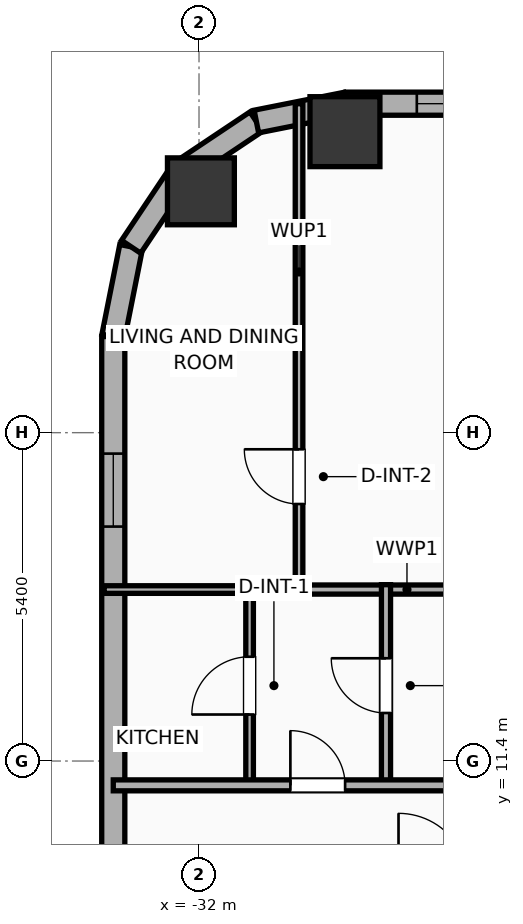
"""IFC4 building model, lengths in metres.
Left out: names, types, materials, properties, quantities, classifications, styles, units other than length and angle.
Written with IfcOpenShell. Run it as: python <this file> out.ifc"""

import sys

from ifc_helpers import new_model, si_unit, direction, frame, frame_2d, origin, origin_2d, place, context, subcontext, project, spatial, rectangle, hollow_rectangle, hollow_circle, extrude, element, fill, save


model = new_model("IFC4")
c1 = context("Model", 3, precision=1e-05, world=origin(), true_north=direction((0.0, 1.0)))
c2 = subcontext(c1, "Body", "Model", "MODEL_VIEW")
j1 = project(units=[si_unit("LENGTHUNIT", "METRE"), si_unit("PLANEANGLEUNIT", "RADIAN")], contexts=[c1])
p1 = place(None, origin())
s1 = spatial("IfcSite", under=j1, at=p1, CompositionType="ELEMENT")
p2 = place(p1, origin())
s2 = spatial("IfcBuilding", under=s1, at=p2, CompositionType="ELEMENT")
p3 = place(p2, frame((0.0, 0.0, 65.0)))
s3 = spatial("IfcBuildingStorey", under=s2, at=p3, CompositionType="ELEMENT", Elevation=65.0)
p4 = place(p3, frame((-29.6, 21.75, 0.0), z_axis=(0.0, 0.0, 1.0), x_axis=(1.0, 0.0, 0.0)))
e1 = element("IfcColumn", 1, at=p4, inside=s3, PredefinedType="COLUMN", context=c2, shape_type="SweptSolid", body=[
    extrude(hollow_rectangle(XDim=1.15, YDim=1.15, WallThickness=0.04, at=origin_2d()), origin(), (0.0, 0.0, 1.0), 3.9),
])
p5 = place(p3, frame((-31.969, 20.769, 0.0), z_axis=(0.0, 0.0, 1.0), x_axis=(1.0, 0.0, 0.0)))
e2 = element("IfcColumn", 2, at=p5, inside=s3, PredefinedType="COLUMN", context=c2, shape_type="SweptSolid", body=[
    extrude(hollow_circle(Radius=0.55, WallThickness=0.036, at=origin_2d()), origin(), (0.0, 0.0, 1.0), 3.9),
])
p6 = place(p3, frame((-33.41, -18.381, 0.0), z_axis=(0.0, 0.0, 1.0), x_axis=(0.0, 1.0, 0.0)))
e3 = element("IfcWall", 3, at=p6, inside=s3, PredefinedType="ELEMENTEDWALL", context=c2, shape_type="SweptSolid", body=[
    extrude(rectangle(XDim=36.763, YDim=0.38, at=frame_2d((18.381, 0.0))), origin(), (0.0, 0.0, 1.0), 3.65),
])
p7 = place(p6, frame((33.637, 0.0, 0.75)))
e4 = element("IfcOpeningElement", 4, at=p7, cuts=e3, PredefinedType="OPENING", context=c2, shape_type="SweptSolid", body=[
    extrude(rectangle(XDim=1.2, YDim=2.05, at=frame_2d((0.6, 1.025))), frame((0.0, 0.2, 0.0), z_axis=(0.0, -1.0, 0.0), x_axis=(1.0, 0.0, 0.0)), (0.0, 0.0, 1.0), 0.4),
])
p8 = place(p6, frame((22.576, 0.0, 0.75)))
e5 = element("IfcOpeningElement", 5, at=p8, cuts=e3, PredefinedType="OPENING", context=c2, shape_type="SweptSolid", body=[
    extrude(rectangle(XDim=1.2, YDim=2.05, at=frame_2d((0.6, 1.025))), frame((0.0, 0.2, 0.0), z_axis=(0.0, -1.0, 0.0), x_axis=(1.0, 0.0, 0.0)), (0.0, 0.0, 1.0), 0.4),
])
p9 = place(p6, frame((13.126, 0.0, 0.75)))
e6 = element("IfcOpeningElement", 6, at=p9, cuts=e3, PredefinedType="OPENING", context=c2, shape_type="SweptSolid", body=[
    extrude(rectangle(XDim=1.2, YDim=2.05, at=frame_2d((0.6, 1.025))), frame((0.0, 0.2, 0.0), z_axis=(0.0, -1.0, 0.0), x_axis=(1.0, 0.0, 0.0)), (0.0, 0.0, 1.0), 0.4),
])
p10 = place(p3, frame((-33.41, 18.381, 0.0), z_axis=(0.0, 0.0, 1.0), x_axis=(0.195086038585, 0.980786132421, 0.0)))
e7 = element("IfcWall", 7, at=p10, inside=s3, PredefinedType="ELEMENTEDWALL", context=c2, shape_type="SweptSolid", body=[
    extrude(rectangle(XDim=1.504, YDim=0.38, at=frame_2d((0.752, 0.0))), origin(), (0.0, 0.0, 1.0), 3.65),
])
p11 = place(p3, frame((-33.116, 19.857, 0.0), z_axis=(0.0, 0.0, 1.0), x_axis=(0.555572577804, 0.831468045563, 0.0)))
e8 = element("IfcWall", 8, at=p11, inside=s3, PredefinedType="ELEMENTEDWALL", context=c2, shape_type="SweptSolid", body=[
    extrude(rectangle(XDim=1.485, YDim=0.38, at=frame_2d((0.742, 0.0))), origin(), (0.0, 0.0, 1.0), 3.65),
])
p12 = place(p3, frame((-32.292, 21.091, 0.0), z_axis=(0.0, 0.0, 1.0), x_axis=(0.831442848281, 0.555610286119, 0.0)))
e9 = element("IfcWall", 9, at=p12, inside=s3, PredefinedType="ELEMENTEDWALL", context=c2, shape_type="SweptSolid", body=[
    extrude(rectangle(XDim=1.485, YDim=0.38, at=frame_2d((0.743, 0.0))), origin(), (0.0, 0.0, 1.0), 3.65),
])
p13 = place(p3, frame((-31.057, 21.917, 0.0), z_axis=(0.0, 0.0, 1.0), x_axis=(0.980786132421, 0.195086038585, 0.0)))
e10 = element("IfcWall", 10, at=p13, inside=s3, PredefinedType="ELEMENTEDWALL", context=c2, shape_type="SweptSolid", body=[
    extrude(rectangle(XDim=1.504, YDim=0.38, at=frame_2d((0.752, 0.0))), origin(), (0.0, 0.0, 1.0), 3.65),
])
p14 = place(p3, frame((-29.581, 22.21, 0.0), z_axis=(0.0, 0.0, 1.0), x_axis=(1.0, 0.0, 0.0)))
e11 = element("IfcWall", 11, at=p14, inside=s3, PredefinedType="ELEMENTEDWALL", context=c2, shape_type="SweptSolid", body=[
    extrude(rectangle(XDim=51.963, YDim=0.38, at=frame_2d((25.981, 0.0))), origin(), (0.0, 0.0, 1.0), 3.65),
])
p15 = place(p14, frame((5.81, 0.0, 0.75)))
e12 = element("IfcOpeningElement", 12, at=p15, cuts=e11, PredefinedType="OPENING", context=c2, shape_type="SweptSolid", body=[
    extrude(rectangle(XDim=2.4, YDim=2.1, at=frame_2d((1.2, 1.05))), frame((0.0, 0.2, 0.0), z_axis=(0.0, -1.0, 0.0), x_axis=(1.0, 0.0, 0.0)), (0.0, 0.0, 1.0), 0.4),
])
p16 = place(p14, frame((26.431, 0.0, 0.75)))
e13 = element("IfcOpeningElement", 13, at=p16, cuts=e11, PredefinedType="OPENING", context=c2, shape_type="SweptSolid", body=[
    extrude(rectangle(XDim=2.4, YDim=2.1, at=frame_2d((1.2, 1.05))), frame((0.0, 0.2, 0.0), z_axis=(0.0, -1.0, 0.0), x_axis=(1.0, 0.0, 0.0)), (0.0, 0.0, 1.0), 0.4),
])
p17 = place(p14, frame((43.752, 0.0, 0.75)))
e14 = element("IfcOpeningElement", 14, at=p17, cuts=e11, PredefinedType="OPENING", context=c2, shape_type="SweptSolid", body=[
    extrude(rectangle(XDim=2.4, YDim=2.1, at=frame_2d((1.2, 1.05))), frame((0.0, 0.2, 0.0), z_axis=(0.0, -1.0, 0.0), x_axis=(1.0, 0.0, 0.0)), (0.0, 0.0, 1.0), 0.4),
])
p18 = place(p14, frame((1.163, 0.0, 0.75)))
e15 = element("IfcOpeningElement", 15, at=p18, cuts=e11, PredefinedType="OPENING", context=c2, shape_type="SweptSolid", body=[
    extrude(rectangle(XDim=1.2, YDim=2.05, at=frame_2d((0.6, 1.025))), frame((0.0, 0.2, 0.0), z_axis=(0.0, -1.0, 0.0), x_axis=(1.0, 0.0, 0.0)), (0.0, 0.0, 1.0), 0.4),
])
p19 = place(p14, frame((3.251, 0.0, 0.75)))
e16 = element("IfcOpeningElement", 16, at=p19, cuts=e11, PredefinedType="OPENING", context=c2, shape_type="SweptSolid", body=[
    extrude(rectangle(XDim=1.2, YDim=2.05, at=frame_2d((0.6, 1.025))), frame((0.0, 0.2, 0.0), z_axis=(0.0, -1.0, 0.0), x_axis=(1.0, 0.0, 0.0)), (0.0, 0.0, 1.0), 0.4),
])
p20 = place(p14, frame((11.745, 0.0, 0.75)))
e17 = element("IfcOpeningElement", 17, at=p20, cuts=e11, PredefinedType="OPENING", context=c2, shape_type="SweptSolid", body=[
    extrude(rectangle(XDim=1.2, YDim=2.05, at=frame_2d((0.6, 1.025))), frame((0.0, 0.2, 0.0), z_axis=(0.0, -1.0, 0.0), x_axis=(1.0, 0.0, 0.0)), (0.0, 0.0, 1.0), 0.4),
])
p21 = place(p14, frame((16.776, 0.0, 0.75)))
e18 = element("IfcOpeningElement", 18, at=p21, cuts=e11, PredefinedType="OPENING", context=c2, shape_type="SweptSolid", body=[
    extrude(rectangle(XDim=1.2, YDim=2.05, at=frame_2d((0.6, 1.025))), frame((0.0, 0.2, 0.0), z_axis=(0.0, -1.0, 0.0), x_axis=(1.0, 0.0, 0.0)), (0.0, 0.0, 1.0), 0.4),
])
p22 = place(p14, frame((21.531, 0.0, 0.75)))
e19 = element("IfcOpeningElement", 19, at=p22, cuts=e11, PredefinedType="OPENING", context=c2, shape_type="SweptSolid", body=[
    extrude(rectangle(XDim=0.85, YDim=2.05, at=frame_2d((0.425, 1.025))), frame((0.0, 0.2, 0.0), z_axis=(0.0, -1.0, 0.0), x_axis=(1.0, 0.0, 0.0)), (0.0, 0.0, 1.0), 0.4),
])
p23 = place(p14, frame((23.776, 0.0, 0.75)))
e20 = element("IfcOpeningElement", 20, at=p23, cuts=e11, PredefinedType="OPENING", context=c2, shape_type="SweptSolid", body=[
    extrude(rectangle(XDim=1.2, YDim=2.05, at=frame_2d((0.6, 1.025))), frame((0.0, 0.2, 0.0), z_axis=(0.0, -1.0, 0.0), x_axis=(1.0, 0.0, 0.0)), (0.0, 0.0, 1.0), 0.4),
])
p24 = place(p14, frame((32.031, 0.0, 0.75)))
e21 = element("IfcOpeningElement", 21, at=p24, cuts=e11, PredefinedType="OPENING", context=c2, shape_type="SweptSolid", body=[
    extrude(rectangle(XDim=0.85, YDim=2.05, at=frame_2d((0.425, 1.025))), frame((0.0, 0.2, 0.0), z_axis=(0.0, -1.0, 0.0), x_axis=(1.0, 0.0, 0.0)), (0.0, 0.0, 1.0), 0.4),
])
p25 = place(p14, frame((34.276, 0.0, 0.75)))
e22 = element("IfcOpeningElement", 22, at=p25, cuts=e11, PredefinedType="OPENING", context=c2, shape_type="SweptSolid", body=[
    extrude(rectangle(XDim=1.2, YDim=2.05, at=frame_2d((0.6, 1.025))), frame((0.0, 0.2, 0.0), z_axis=(0.0, -1.0, 0.0), x_axis=(1.0, 0.0, 0.0)), (0.0, 0.0, 1.0), 0.4),
])
p26 = place(p14, frame((37.776, 0.0, 0.75)))
e23 = element("IfcOpeningElement", 23, at=p26, cuts=e11, PredefinedType="OPENING", context=c2, shape_type="SweptSolid", body=[
    extrude(rectangle(XDim=1.2, YDim=2.05, at=frame_2d((0.6, 1.025))), frame((0.0, 0.2, 0.0), z_axis=(0.0, -1.0, 0.0), x_axis=(1.0, 0.0, 0.0)), (0.0, 0.0, 1.0), 0.4),
])
p27 = place(p14, frame((42.411, 0.0, 0.75)))
e24 = element("IfcOpeningElement", 24, at=p27, cuts=e11, PredefinedType="OPENING", context=c2, shape_type="SweptSolid", body=[
    extrude(rectangle(XDim=0.85, YDim=2.05, at=frame_2d((0.425, 1.025))), frame((0.0, 0.2, 0.0), z_axis=(0.0, -1.0, 0.0), x_axis=(1.0, 0.0, 0.0)), (0.0, 0.0, 1.0), 0.4),
])
p28 = place(p14, frame((47.791, 0.0, 0.75)))
e25 = element("IfcOpeningElement", 25, at=p28, cuts=e11, PredefinedType="OPENING", context=c2, shape_type="SweptSolid", body=[
    extrude(rectangle(XDim=1.2, YDim=2.05, at=frame_2d((0.6, 1.025))), frame((0.0, 0.2, 0.0), z_axis=(0.0, -1.0, 0.0), x_axis=(1.0, 0.0, 0.0)), (0.0, 0.0, 1.0), 0.4),
])
p29 = place(p14, frame((49.901, 0.0, 0.75)))
e26 = element("IfcOpeningElement", 26, at=p29, cuts=e11, PredefinedType="OPENING", context=c2, shape_type="SweptSolid", body=[
    extrude(rectangle(XDim=1.2, YDim=2.05, at=frame_2d((0.6, 1.025))), frame((0.0, 0.2, 0.0), z_axis=(0.0, -1.0, 0.0), x_axis=(1.0, 0.0, 0.0)), (0.0, 0.0, 1.0), 0.4),
])
p30 = place(p3, frame((-30.355, 14.14, 0.0), z_axis=(0.0, 0.0, 1.0), x_axis=(0.0, 1.0, 0.0)))
e27 = element("IfcWall", 27, at=p30, inside=s3, PredefinedType="PARTITIONING", context=c2, shape_type="SweptSolid", body=[
    extrude(rectangle(XDim=8.069, YDim=0.125, at=frame_2d((4.035, 0.0))), origin(), (0.0, 0.0, 1.0), 3.65),
])
p31 = place(p30, frame((1.487, 0.0, 0.0)))
e28 = element("IfcOpeningElement", 28, at=p31, cuts=e27, PredefinedType="OPENING", context=c2, shape_type="SweptSolid", body=[
    extrude(rectangle(XDim=0.9, YDim=2.05, at=frame_2d((0.45, 1.025))), frame((0.0, 0.073, 0.0), z_axis=(0.0, -1.0, 0.0), x_axis=(1.0, 0.0, 0.0)), (0.0, 0.0, 1.0), 0.145),
])
p32 = place(p3, frame((-30.475, 14.22, 0.0), z_axis=(0.0, 0.0, 1.0), x_axis=(1.0, 0.0, 0.0)))
e29 = element("IfcWall", 29, at=p32, inside=s3, PredefinedType="PLUMBINGWALL", context=c2, shape_type="SweptSolid", body=[
    extrude(rectangle(XDim=3.79, YDim=0.15, at=frame_2d((1.895, 0.0))), origin(), (0.0, 0.0, 1.0), 3.65),
])
p33 = place(p3, frame((-31.168, 10.98, 0.0), z_axis=(0.0, 0.0, 1.0), x_axis=(0.0, 1.0, 0.0)))
e30 = element("IfcWall", 30, at=p33, inside=s3, PredefinedType="PARTITIONING", context=c2, shape_type="SweptSolid", body=[
    extrude(rectangle(XDim=3.32, YDim=0.125, at=frame_2d((1.66, 0.0))), origin(), (0.0, 0.0, 1.0), 3.65),
])
p34 = place(p33, frame((1.185, 0.0, 0.0)))
e31 = element("IfcOpeningElement", 31, at=p34, cuts=e30, PredefinedType="OPENING", context=c2, shape_type="SweptSolid", body=[
    extrude(rectangle(XDim=0.95, YDim=2.05, at=frame_2d((0.475, 1.025))), frame((0.0, 0.073, 0.0), z_axis=(0.0, -1.0, 0.0), x_axis=(1.0, 0.0, 0.0)), (0.0, 0.0, 1.0), 0.145),
])
p35 = place(p3, frame((-33.56, 14.22, 0.0), z_axis=(0.0, 0.0, 1.0), x_axis=(1.0, 0.0, 0.0)))
e32 = element("IfcWall", 32, at=p35, inside=s3, PredefinedType="PARTITIONING", context=c2, shape_type="SweptSolid", body=[
    extrude(rectangle(XDim=2.512, YDim=0.125, at=frame_2d((1.256, 0.0))), origin(), (0.0, 0.0, 1.0), 3.65),
])
p36 = place(p3, frame((-28.925, 10.98, 0.0), z_axis=(0.0, 0.0, 1.0), x_axis=(0.0, 1.0, 0.0)))
e33 = element("IfcWall", 33, at=p36, inside=s3, PredefinedType="PLUMBINGWALL", context=c2, shape_type="SweptSolid", body=[
    extrude(rectangle(XDim=3.32, YDim=0.15, at=frame_2d((1.66, 0.0))), origin(), (0.0, 0.0, 1.0), 3.65),
])
p37 = place(p36, frame((1.21, 0.0, 0.0)))
e34 = element("IfcOpeningElement", 34, at=p37, cuts=e33, PredefinedType="OPENING", context=c2, shape_type="SweptSolid", body=[
    extrude(rectangle(XDim=0.9, YDim=2.05, at=frame_2d((0.45, 1.025))), frame((0.0, 0.085, 0.0), z_axis=(0.0, -1.0, 0.0), x_axis=(1.0, 0.0, 0.0)), (0.0, 0.0, 1.0), 0.17),
])
p38 = place(p3, frame((-33.41, 11.0, 0.0), z_axis=(0.0, 0.0, 1.0), x_axis=(1.0, 0.0, 0.0)))
e35 = element("IfcWall", 35, at=p38, inside=s3, PredefinedType="PARTITIONING", context=c2, shape_type="SweptSolid", body=[
    extrude(rectangle(XDim=59.62, YDim=0.18, at=frame_2d((29.81, 0.0))), origin(), (0.0, 0.0, 1.0), 3.65),
])
p39 = place(p38, frame((2.913, 0.0, 0.0)))
e36 = element("IfcOpeningElement", 36, at=p39, cuts=e35, PredefinedType="OPENING", context=c2, shape_type="SweptSolid", body=[
    extrude(rectangle(XDim=0.9, YDim=2.05, at=frame_2d((0.45, 1.025))), frame((0.0, 0.1, 0.0), z_axis=(0.0, -1.0, 0.0), x_axis=(1.0, 0.0, 0.0)), (0.0, 0.0, 1.0), 0.2),
])
p40 = place(p38, frame((10.312, 0.0, 0.0)))
e37 = element("IfcOpeningElement", 37, at=p40, cuts=e35, PredefinedType="OPENING", context=c2, shape_type="SweptSolid", body=[
    extrude(rectangle(XDim=1.15, YDim=2.05, at=frame_2d((0.575, 1.025))), frame((0.0, 0.1, 0.0), z_axis=(0.0, -1.0, 0.0), x_axis=(1.0, 0.0, 0.0)), (0.0, 0.0, 1.0), 0.2),
])
p41 = place(p38, frame((15.85, 0.0, 0.0)))
e38 = element("IfcOpeningElement", 38, at=p41, cuts=e35, PredefinedType="OPENING", context=c2, shape_type="SweptSolid", body=[
    extrude(rectangle(XDim=0.9, YDim=2.05, at=frame_2d((0.45, 1.025))), frame((0.0, 0.1, 0.0), z_axis=(0.0, -1.0, 0.0), x_axis=(1.0, 0.0, 0.0)), (0.0, 0.0, 1.0), 0.2),
])
p42 = place(p38, frame((22.623, 0.0, 0.0)))
e39 = element("IfcOpeningElement", 39, at=p42, cuts=e35, PredefinedType="OPENING", context=c2, shape_type="SweptSolid", body=[
    extrude(rectangle(XDim=0.9, YDim=2.05, at=frame_2d((0.45, 1.025))), frame((0.0, 0.1, 0.0), z_axis=(0.0, -1.0, 0.0), x_axis=(1.0, 0.0, 0.0)), (0.0, 0.0, 1.0), 0.2),
])
p43 = place(p38, frame((29.622, 0.0, 0.0)))
e40 = element("IfcOpeningElement", 40, at=p43, cuts=e35, PredefinedType="OPENING", context=c2, shape_type="SweptSolid", body=[
    extrude(rectangle(XDim=0.9, YDim=2.05, at=frame_2d((0.45, 1.025))), frame((0.0, 0.1, 0.0), z_axis=(0.0, -1.0, 0.0), x_axis=(1.0, 0.0, 0.0)), (0.0, 0.0, 1.0), 0.2),
])
p44 = place(p38, frame((36.628, 0.0, 0.0)))
e41 = element("IfcOpeningElement", 41, at=p44, cuts=e35, PredefinedType="OPENING", context=c2, shape_type="SweptSolid", body=[
    extrude(rectangle(XDim=0.9, YDim=2.05, at=frame_2d((0.45, 1.025))), frame((0.0, 0.1, 0.0), z_axis=(0.0, -1.0, 0.0), x_axis=(1.0, 0.0, 0.0)), (0.0, 0.0, 1.0), 0.2),
])
p45 = place(p38, frame((43.627, 0.0, 0.0)))
e42 = element("IfcOpeningElement", 42, at=p45, cuts=e35, PredefinedType="OPENING", context=c2, shape_type="SweptSolid", body=[
    extrude(rectangle(XDim=0.9, YDim=2.05, at=frame_2d((0.45, 1.025))), frame((0.0, 0.1, 0.0), z_axis=(0.0, -1.0, 0.0), x_axis=(1.0, 0.0, 0.0)), (0.0, 0.0, 1.0), 0.2),
])
p46 = place(p38, frame((48.617, 0.0, 0.0)))
e43 = element("IfcOpeningElement", 43, at=p46, cuts=e35, PredefinedType="OPENING", context=c2, shape_type="SweptSolid", body=[
    extrude(rectangle(XDim=1.15, YDim=2.05, at=frame_2d((0.575, 1.025))), frame((0.0, 0.1, 0.0), z_axis=(0.0, -1.0, 0.0), x_axis=(1.0, 0.0, 0.0)), (0.0, 0.0, 1.0), 0.2),
])
p47 = place(p38, frame((56.272, 0.0, 0.0)))
e44 = element("IfcOpeningElement", 44, at=p47, cuts=e35, PredefinedType="OPENING", context=c2, shape_type="SweptSolid", body=[
    extrude(rectangle(XDim=0.9, YDim=2.05, at=frame_2d((0.45, 1.025))), frame((0.0, 0.1, 0.0), z_axis=(0.0, -1.0, 0.0), x_axis=(1.0, 0.0, 0.0)), (0.0, 0.0, 1.0), 0.2),
])
p48 = place(p7, origin())
e45 = element("IfcWindow", 45, at=p48, inside=s3, PartitioningType="SINGLE_PANEL", PredefinedType="WINDOW", context=c2, shape_type="SweptSolid", body=[
    extrude(rectangle(XDim=1.2, YDim=2.05, at=frame_2d((0.6, 1.025))), frame((0.0, 0.03, 0.0), z_axis=(0.0, -1.0, 0.0), x_axis=(1.0, 0.0, 0.0)), (0.0, 0.0, 1.0), 0.06),
])
fill(e4, e45)
p49 = place(p18, origin())
e46 = element("IfcWindow", 46, at=p49, inside=s3, PartitioningType="SINGLE_PANEL", PredefinedType="WINDOW", context=c2, shape_type="SweptSolid", body=[
    extrude(rectangle(XDim=1.2, YDim=2.05, at=frame_2d((0.6, 1.025))), frame((0.0, 0.03, 0.0), z_axis=(0.0, -1.0, 0.0), x_axis=(1.0, 0.0, 0.0)), (0.0, 0.0, 1.0), 0.06),
])
fill(e15, e46)
p50 = place(p31, origin())
e47 = element("IfcDoor", 47, at=p50, inside=s3, OperationType="SINGLE_SWING_RIGHT", PredefinedType="DOOR", context=c2, shape_type="SweptSolid", body=[
    extrude(rectangle(XDim=0.9, YDim=2.05, at=frame_2d((0.45, 1.025))), frame((0.0, 0.025, 0.0), z_axis=(0.0, -1.0, 0.0), x_axis=(1.0, 0.0, 0.0)), (0.0, 0.0, 1.0), 0.05),
])
fill(e28, e47)
p51 = place(p34, origin())
e48 = element("IfcDoor", 48, at=p51, inside=s3, OperationType="SINGLE_SWING_LEFT", PredefinedType="DOOR", context=c2, shape_type="SweptSolid", body=[
    extrude(rectangle(XDim=0.95, YDim=2.05, at=frame_2d((0.475, 1.025))), frame((0.0, 0.025, 0.0), z_axis=(0.0, -1.0, 0.0), x_axis=(1.0, 0.0, 0.0)), (0.0, 0.0, 1.0), 0.05),
])
fill(e31, e48)
p52 = place(p37, origin())
e49 = element("IfcDoor", 49, at=p52, inside=s3, OperationType="SINGLE_SWING_RIGHT", PredefinedType="DOOR", context=c2, shape_type="SweptSolid", body=[
    extrude(rectangle(XDim=0.9, YDim=2.05, at=frame_2d((0.45, 1.025))), frame((0.0, 0.025, 0.0), z_axis=(0.0, -1.0, 0.0), x_axis=(1.0, 0.0, 0.0)), (0.0, 0.0, 1.0), 0.05),
])
fill(e34, e49)
p53 = place(p39, origin())
e50 = element("IfcDoor", 50, at=p53, inside=s3, OperationType="SINGLE_SWING_LEFT", PredefinedType="DOOR", context=c2, shape_type="SweptSolid", body=[
    extrude(rectangle(XDim=0.9, YDim=2.05, at=frame_2d((0.45, 1.025))), frame((0.0, 0.025, 0.0), z_axis=(0.0, -1.0, 0.0), x_axis=(1.0, 0.0, 0.0)), (0.0, 0.0, 1.0), 0.05),
])
fill(e36, e50)
save(model, sys.argv[1])
